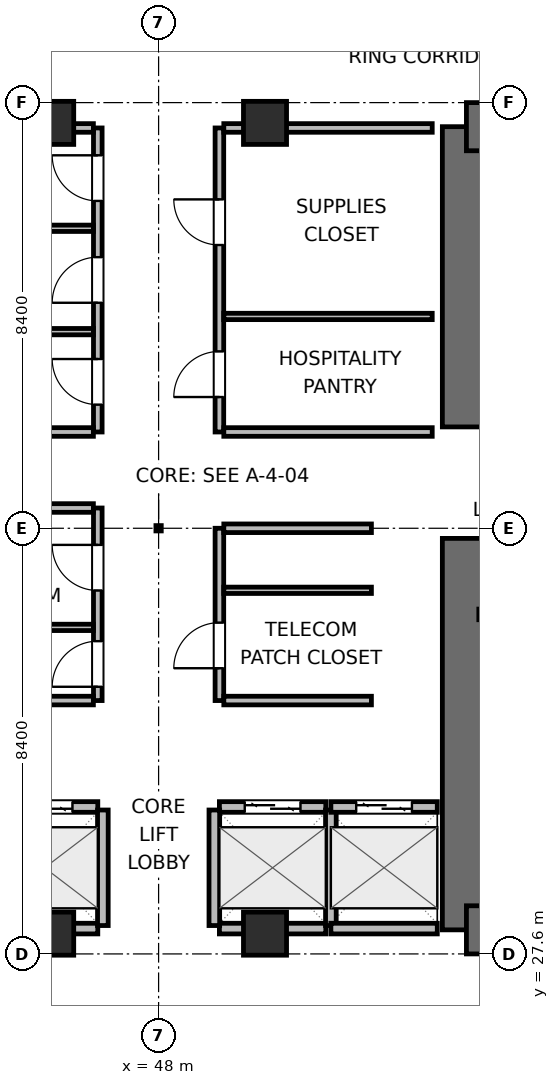
"""IFC4 building model, lengths in metres.
Left out: names, types, materials, properties, quantities, classifications, styles, units other than length and angle.
Written with IfcOpenShell. Run it as: python <this file> out.ifc"""

import sys

from ifc_helpers import new_model, si_unit, direction, frame, frame_2d, origin, origin_2d, place, context, subcontext, project, spatial, rectangle, extrude, element, fill, save


model = new_model("IFC4")
c1 = context("Model", 3, precision=1e-05, world=origin(), true_north=direction((0.0, 1.0)))
c2 = subcontext(c1, "Body", "Model", "MODEL_VIEW")
j1 = project(units=[si_unit("LENGTHUNIT", "METRE"), si_unit("PLANEANGLEUNIT", "RADIAN")], contexts=[c1])
p1 = place(None, origin())
s1 = spatial("IfcSite", under=j1, at=p1, CompositionType="ELEMENT")
p2 = place(p1, origin())
s2 = spatial("IfcBuilding", under=s1, at=p2, CompositionType="ELEMENT")
p3 = place(p2, frame((0.0, 0.0, 33.3)))
s3 = spatial("IfcBuildingStorey", under=s2, at=p3, CompositionType="ELEMENT", Elevation=33.3)
p4 = place(p3, frame((54.075, 28.075, 0.0), z_axis=(0.0, 0.0, 1.0), x_axis=(0.0, 1.0, 0.0)))
e1 = element("IfcWall", 1, at=p4, inside=s3, PredefinedType="SHEAR", context=c2, shape_type="SweptSolid", body=[
    extrude(rectangle(XDim=7.725, YDim=0.95, at=frame_2d((3.863, 0.0))), origin(), (0.0, 0.0, 1.0), 3.9),
])
p5 = place(p3, frame((54.075, 38.0, 0.0), z_axis=(0.0, 0.0, 1.0), x_axis=(0.0, 1.0, 0.0)))
e2 = element("IfcWall", 2, at=p5, inside=s3, PredefinedType="SHEAR", context=c2, shape_type="SweptSolid", body=[
    extrude(rectangle(XDim=5.925, YDim=0.95, at=frame_2d((2.962, 0.0))), origin(), (0.0, 0.0, 1.0), 3.9),
])
p6 = place(p3, frame((54.075, 28.075, 0.0), z_axis=(0.0, 0.0, 1.0), x_axis=(1.0, 0.0, 0.0)))
e3 = element("IfcWall", 3, at=p6, inside=s3, PredefinedType="SHEAR", context=c2, shape_type="SweptSolid", body=[
    extrude(rectangle(XDim=9.05, YDim=0.95, at=frame_2d((4.525, 0.0))), origin(), (0.0, 0.0, 1.0), 3.9),
])
p7 = place(p6, frame((3.925, 0.0, 0.0)))
e4 = element("IfcOpeningElement", 4, at=p7, cuts=e3, PredefinedType="OPENING", context=c2, shape_type="SweptSolid", body=[
    extrude(rectangle(XDim=1.05, YDim=2.04, at=frame_2d((0.525, 1.02))), frame((0.0, 0.485, 0.0), z_axis=(0.0, -1.0, 0.0), x_axis=(1.0, 0.0, 0.0)), (0.0, 0.0, 1.0), 0.97),
])
p8 = place(p3, frame((54.075, 43.925, 0.0), z_axis=(0.0, 0.0, 1.0), x_axis=(1.0, 0.0, 0.0)))
e5 = element("IfcWall", 5, at=p8, inside=s3, PredefinedType="SHEAR", context=c2, shape_type="SweptSolid", body=[
    extrude(rectangle(XDim=9.05, YDim=0.95, at=frame_2d((4.525, 0.0))), origin(), (0.0, 0.0, 1.0), 3.9),
])
for number, where, z_axis, x_axis in (
    (6, (45.9, 28.0, 0.0), (0.0, 0.0, 1.0), (1.0, 0.0, 0.0)),
    (7, (50.1, 28.0, 0.0), (0.0, 0.0, 1.0), (1.0, 0.0, 0.0)),
    (8, (45.9, 44.0, 0.0), (0.0, 0.0, 1.0), (1.0, 0.0, 0.0)),
    (9, (50.1, 44.0, 0.0), (0.0, 0.0, 1.0), (1.0, 0.0, 0.0)),
):
    element("IfcColumn", number, at=place(p3, frame(where, z_axis=z_axis, x_axis=x_axis)), inside=s3, PredefinedType="COLUMN", context=c2, shape_type="SweptSolid", body=[
        extrude(rectangle(XDim=0.85, YDim=0.85, at=origin_2d()), origin(), (0.0, 0.0, 1.0), 3.9),
    ])
p9 = place(p3, frame((44.7, 30.5, 0.0), z_axis=(0.0, 0.0, 1.0), x_axis=(1.0, 0.0, 0.0)))
e10 = element("IfcWall", 10, at=p9, inside=s3, PredefinedType="PARTITIONING", context=c2, shape_type="SweptSolid", body=[
    extrude(rectangle(XDim=2.1, YDim=0.21, at=frame_2d((1.05, 0.0))), origin(), (0.0, 0.0, 1.0), 3.64),
])
p10 = place(p9, frame((0.5, 0.0, 0.0)))
e11 = element("IfcOpeningElement", 11, at=p10, cuts=e10, PredefinedType="OPENING", context=c2, shape_type="SweptSolid", body=[
    extrude(rectangle(XDim=1.1, YDim=2.04, at=frame_2d((0.55, 1.02))), frame((0.0, 0.115, 0.0), z_axis=(0.0, -1.0, 0.0), x_axis=(1.0, 0.0, 0.0)), (0.0, 0.0, 1.0), 0.23),
])
p11 = place(p3, frame((44.7, 28.1, 0.0), z_axis=(0.0, 0.0, 1.0), x_axis=(1.0, 0.0, 0.0)))
e12 = element("IfcWall", 12, at=p11, inside=s3, PredefinedType="PARTITIONING", context=c2, shape_type="SweptSolid", body=[
    extrude(rectangle(XDim=2.1, YDim=0.21, at=frame_2d((1.05, 0.0))), origin(), (0.0, 0.0, 1.0), 2.525),
])
p12 = place(p3, frame((46.9, 28.16, 0.0), z_axis=(0.0, 0.0, 1.0), x_axis=(0.0, 1.0, 0.0)))
e13 = element("IfcWall", 13, at=p12, inside=s3, PredefinedType="PARTITIONING", context=c2, shape_type="SweptSolid", body=[
    extrude(rectangle(XDim=2.28, YDim=0.21, at=frame_2d((1.14, 0.0))), origin(), (0.0, 0.0, 1.0), 3.64),
])
p13 = place(p3, frame((49.2, 30.5, 0.0), z_axis=(0.0, 0.0, 1.0), x_axis=(1.0, 0.0, 0.0)))
e14 = element("IfcWall", 14, at=p13, inside=s3, PredefinedType="PARTITIONING", context=c2, shape_type="SweptSolid", body=[
    extrude(rectangle(XDim=2.1, YDim=0.21, at=frame_2d((1.05, 0.0))), origin(), (0.0, 0.0, 1.0), 3.64),
])
p14 = place(p13, frame((0.5, 0.0, 0.0)))
e15 = element("IfcOpeningElement", 15, at=p14, cuts=e14, PredefinedType="OPENING", context=c2, shape_type="SweptSolid", body=[
    extrude(rectangle(XDim=1.1, YDim=2.04, at=frame_2d((0.55, 1.02))), frame((0.0, 0.115, 0.0), z_axis=(0.0, -1.0, 0.0), x_axis=(1.0, 0.0, 0.0)), (0.0, 0.0, 1.0), 0.23),
])
p15 = place(p3, frame((49.2, 28.1, 0.0), z_axis=(0.0, 0.0, 1.0), x_axis=(1.0, 0.0, 0.0)))
e16 = element("IfcWall", 16, at=p15, inside=s3, PredefinedType="PARTITIONING", context=c2, shape_type="SweptSolid", body=[
    extrude(rectangle(XDim=2.1, YDim=0.21, at=frame_2d((1.05, 0.0))), origin(), (0.0, 0.0, 1.0), 2.525),
])
for number, where, z_axis, x_axis in (
    (17, (49.1, 28.16, 0.0), (0.0, 0.0, 1.0), (0.0, 1.0, 0.0)),
    (18, (51.4, 28.16, 0.0), (0.0, 0.0, 1.0), (0.0, 1.0, 0.0)),
):
    element("IfcWall", number, at=place(p3, frame(where, z_axis=z_axis, x_axis=x_axis)), inside=s3, PredefinedType="PARTITIONING", context=c2, shape_type="SweptSolid", body=[
        extrude(rectangle(XDim=2.28, YDim=0.21, at=frame_2d((1.14, 0.0))), origin(), (0.0, 0.0, 1.0), 3.64),
    ])
p16 = place(p3, frame((51.4, 30.5, 0.0), z_axis=(0.0, 0.0, 1.0), x_axis=(1.0, 0.0, 0.0)))
e19 = element("IfcWall", 19, at=p16, inside=s3, PredefinedType="PARTITIONING", context=c2, shape_type="SweptSolid", body=[
    extrude(rectangle(XDim=2.1, YDim=0.21, at=frame_2d((1.05, 0.0))), origin(), (0.0, 0.0, 1.0), 3.64),
])
p17 = place(p16, frame((0.5, 0.0, 0.0)))
e20 = element("IfcOpeningElement", 20, at=p17, cuts=e19, PredefinedType="OPENING", context=c2, shape_type="SweptSolid", body=[
    extrude(rectangle(XDim=1.1, YDim=2.04, at=frame_2d((0.55, 1.02))), frame((0.0, 0.115, 0.0), z_axis=(0.0, -1.0, 0.0), x_axis=(1.0, 0.0, 0.0)), (0.0, 0.0, 1.0), 0.23),
])
p18 = place(p3, frame((51.4, 28.1, 0.0), z_axis=(0.0, 0.0, 1.0), x_axis=(1.0, 0.0, 0.0)))
e21 = element("IfcWall", 21, at=p18, inside=s3, PredefinedType="PARTITIONING", context=c2, shape_type="SweptSolid", body=[
    extrude(rectangle(XDim=2.1, YDim=0.21, at=frame_2d((1.05, 0.0))), origin(), (0.0, 0.0, 1.0), 2.525),
])
p19 = place(p3, frame((46.8, 32.6, 0.0), z_axis=(0.0, 0.0, 1.0), x_axis=(0.0, 1.0, 0.0)))
e22 = element("IfcWall", 22, at=p19, inside=s3, PredefinedType="PARTITIONING", context=c2, shape_type="SweptSolid", body=[
    extrude(rectangle(XDim=3.8, YDim=0.17, at=frame_2d((1.9, 0.0))), origin(), (0.0, 0.0, 1.0), 3.64),
])
p20 = place(p19, frame((0.272, 0.0, 0.0)))
e23 = element("IfcOpeningElement", 23, at=p20, cuts=e22, PredefinedType="OPENING", context=c2, shape_type="SweptSolid", body=[
    extrude(rectangle(XDim=0.9, YDim=2.02, at=frame_2d((0.45, 1.01))), frame((0.0, 0.095, 0.0), z_axis=(0.0, -1.0, 0.0), x_axis=(1.0, 0.0, 0.0)), (0.0, 0.0, 1.0), 0.19),
])
p21 = place(p19, frame((2.172, 0.0, 0.0)))
e24 = element("IfcOpeningElement", 24, at=p21, cuts=e22, PredefinedType="OPENING", context=c2, shape_type="SweptSolid", body=[
    extrude(rectangle(XDim=0.9, YDim=2.02, at=frame_2d((0.45, 1.01))), frame((0.0, 0.095, 0.0), z_axis=(0.0, -1.0, 0.0), x_axis=(1.0, 0.0, 0.0)), (0.0, 0.0, 1.0), 0.19),
])
for number, where, z_axis, x_axis in (
    (25, (43.8, 32.6, 0.0), (0.0, 0.0, 1.0), (1.0, 0.0, 0.0)),
    (26, (43.8, 36.4, 0.0), (0.0, 0.0, 1.0), (1.0, 0.0, 0.0)),
):
    element("IfcWall", number, at=place(p3, frame(where, z_axis=z_axis, x_axis=x_axis)), inside=s3, PredefinedType="PARTITIONING", context=c2, shape_type="SweptSolid", body=[
        extrude(rectangle(XDim=2.913, YDim=0.17, at=frame_2d((1.457, 0.0))), origin(), (0.0, 0.0, 1.0), 3.64),
    ])
p22 = place(p3, frame((43.8, 34.044, 0.0), z_axis=(0.0, 0.0, 1.0), x_axis=(1.0, 0.0, 0.0)))
e27 = element("IfcWall", 27, at=p22, inside=s3, PredefinedType="PARTITIONING", context=c2, shape_type="SweptSolid", body=[
    extrude(rectangle(XDim=2.913, YDim=0.125, at=frame_2d((1.457, 0.0))), origin(), (0.0, 0.0, 1.0), 3.64),
])
p23 = place(p3, frame((49.2, 32.6, 0.0), z_axis=(0.0, 0.0, 1.0), x_axis=(0.0, 1.0, 0.0)))
e28 = element("IfcWall", 28, at=p23, inside=s3, PredefinedType="PARTITIONING", context=c2, shape_type="SweptSolid", body=[
    extrude(rectangle(XDim=3.4, YDim=0.17, at=frame_2d((1.7, 0.0))), origin(), (0.0, 0.0, 1.0), 3.64),
])
p24 = place(p23, frame((0.638, 0.0, 0.0)))
e29 = element("IfcOpeningElement", 29, at=p24, cuts=e28, PredefinedType="OPENING", context=c2, shape_type="SweptSolid", body=[
    extrude(rectangle(XDim=0.9, YDim=2.02, at=frame_2d((0.45, 1.01))), frame((0.0, 0.095, 0.0), z_axis=(0.0, -1.0, 0.0), x_axis=(1.0, 0.0, 0.0)), (0.0, 0.0, 1.0), 0.19),
])
for number, where, z_axis, x_axis in (
    (30, (49.287, 32.6, 0.0), (0.0, 0.0, 1.0), (1.0, 0.0, 0.0)),
    (31, (49.287, 36.0, 0.0), (0.0, 0.0, 1.0), (1.0, 0.0, 0.0)),
):
    element("IfcWall", number, at=place(p3, frame(where, z_axis=z_axis, x_axis=x_axis)), inside=s3, PredefinedType="PARTITIONING", context=c2, shape_type="SweptSolid", body=[
        extrude(rectangle(XDim=2.913, YDim=0.17, at=frame_2d((1.457, 0.0))), origin(), (0.0, 0.0, 1.0), 3.64),
    ])
p25 = place(p3, frame((49.287, 34.776, 0.0), z_axis=(0.0, 0.0, 1.0), x_axis=(1.0, 0.0, 0.0)))
e32 = element("IfcWall", 32, at=p25, inside=s3, PredefinedType="PARTITIONING", context=c2, shape_type="SweptSolid", body=[
    extrude(rectangle(XDim=2.913, YDim=0.125, at=frame_2d((1.457, 0.0))), origin(), (0.0, 0.0, 1.0), 3.64),
])
p26 = place(p3, frame((46.8, 37.9, 0.0), z_axis=(0.0, 0.0, 1.0), x_axis=(0.0, 1.0, 0.0)))
e33 = element("IfcWall", 33, at=p26, inside=s3, PredefinedType="PARTITIONING", context=c2, shape_type="SweptSolid", body=[
    extrude(rectangle(XDim=6.0, YDim=0.17, at=frame_2d((3.0, 0.0))), origin(), (0.0, 0.0, 1.0), 3.64),
])
p27 = place(p26, frame((0.54, 0.0, 0.0)))
e34 = element("IfcOpeningElement", 34, at=p27, cuts=e33, PredefinedType="OPENING", context=c2, shape_type="SweptSolid", body=[
    extrude(rectangle(XDim=0.9, YDim=2.02, at=frame_2d((0.45, 1.01))), frame((0.0, 0.095, 0.0), z_axis=(0.0, -1.0, 0.0), x_axis=(1.0, 0.0, 0.0)), (0.0, 0.0, 1.0), 0.19),
])
p28 = place(p26, frame((2.55, 0.0, 0.0)))
e35 = element("IfcOpeningElement", 35, at=p28, cuts=e33, PredefinedType="OPENING", context=c2, shape_type="SweptSolid", body=[
    extrude(rectangle(XDim=0.9, YDim=2.02, at=frame_2d((0.45, 1.01))), frame((0.0, 0.095, 0.0), z_axis=(0.0, -1.0, 0.0), x_axis=(1.0, 0.0, 0.0)), (0.0, 0.0, 1.0), 0.19),
])
p29 = place(p26, frame((4.56, 0.0, 0.0)))
e36 = element("IfcOpeningElement", 36, at=p29, cuts=e33, PredefinedType="OPENING", context=c2, shape_type="SweptSolid", body=[
    extrude(rectangle(XDim=0.9, YDim=2.02, at=frame_2d((0.45, 1.01))), frame((0.0, 0.095, 0.0), z_axis=(0.0, -1.0, 0.0), x_axis=(1.0, 0.0, 0.0)), (0.0, 0.0, 1.0), 0.19),
])
p30 = place(p3, frame((42.5, 37.9, 0.0), z_axis=(0.0, 0.0, 1.0), x_axis=(1.0, 0.0, 0.0)))
e37 = element("IfcWall", 37, at=p30, inside=s3, PredefinedType="PARTITIONING", context=c2, shape_type="SweptSolid", body=[
    extrude(rectangle(XDim=4.213, YDim=0.17, at=frame_2d((2.106, 0.0))), origin(), (0.0, 0.0, 1.0), 3.64),
])
p31 = place(p3, frame((42.5, 43.9, 0.0), z_axis=(0.0, 0.0, 1.0), x_axis=(1.0, 0.0, 0.0)))
e38 = element("IfcWall", 38, at=p31, inside=s3, PredefinedType="PARTITIONING", context=c2, shape_type="SweptSolid", body=[
    extrude(rectangle(XDim=4.213, YDim=0.17, at=frame_2d((2.106, 0.0))), origin(), (0.0, 0.0, 1.0), 2.525),
])
for number, where, z_axis, x_axis in (
    (39, (42.5, 39.88, 0.0), (0.0, 0.0, 1.0), (1.0, 0.0, 0.0)),
    (40, (42.5, 41.92, 0.0), (0.0, 0.0, 1.0), (1.0, 0.0, 0.0)),
):
    element("IfcWall", number, at=place(p3, frame(where, z_axis=z_axis, x_axis=x_axis)), inside=s3, PredefinedType="PARTITIONING", context=c2, shape_type="SweptSolid", body=[
        extrude(rectangle(XDim=4.213, YDim=0.125, at=frame_2d((2.106, 0.0))), origin(), (0.0, 0.0, 1.0), 3.64),
    ])
p32 = place(p3, frame((49.2, 37.9, 0.0), z_axis=(0.0, 0.0, 1.0), x_axis=(0.0, 1.0, 0.0)))
e41 = element("IfcWall", 41, at=p32, inside=s3, PredefinedType="PARTITIONING", context=c2, shape_type="SweptSolid", body=[
    extrude(rectangle(XDim=6.0, YDim=0.17, at=frame_2d((3.0, 0.0))), origin(), (0.0, 0.0, 1.0), 3.64),
])
p33 = place(p32, frame((0.69, 0.0, 0.0)))
e42 = element("IfcOpeningElement", 42, at=p33, cuts=e41, PredefinedType="OPENING", context=c2, shape_type="SweptSolid", body=[
    extrude(rectangle(XDim=0.9, YDim=2.02, at=frame_2d((0.45, 1.01))), frame((0.0, 0.095, 0.0), z_axis=(0.0, -1.0, 0.0), x_axis=(1.0, 0.0, 0.0)), (0.0, 0.0, 1.0), 0.19),
])
p34 = place(p32, frame((3.69, 0.0, 0.0)))
e43 = element("IfcOpeningElement", 43, at=p34, cuts=e41, PredefinedType="OPENING", context=c2, shape_type="SweptSolid", body=[
    extrude(rectangle(XDim=0.9, YDim=2.02, at=frame_2d((0.45, 1.01))), frame((0.0, 0.095, 0.0), z_axis=(0.0, -1.0, 0.0), x_axis=(1.0, 0.0, 0.0)), (0.0, 0.0, 1.0), 0.19),
])
p35 = place(p3, frame((49.287, 37.9, 0.0), z_axis=(0.0, 0.0, 1.0), x_axis=(1.0, 0.0, 0.0)))
e44 = element("IfcWall", 44, at=p35, inside=s3, PredefinedType="PARTITIONING", context=c2, shape_type="SweptSolid", body=[
    extrude(rectangle(XDim=4.113, YDim=0.17, at=frame_2d((2.056, 0.0))), origin(), (0.0, 0.0, 1.0), 3.64),
])
p36 = place(p3, frame((49.287, 43.9, 0.0), z_axis=(0.0, 0.0, 1.0), x_axis=(1.0, 0.0, 0.0)))
e45 = element("IfcWall", 45, at=p36, inside=s3, PredefinedType="PARTITIONING", context=c2, shape_type="SweptSolid", body=[
    extrude(rectangle(XDim=4.113, YDim=0.17, at=frame_2d((2.056, 0.0))), origin(), (0.0, 0.0, 1.0), 2.525),
])
p37 = place(p3, frame((49.287, 40.18, 0.0), z_axis=(0.0, 0.0, 1.0), x_axis=(1.0, 0.0, 0.0)))
e46 = element("IfcWall", 46, at=p37, inside=s3, PredefinedType="PARTITIONING", context=c2, shape_type="SweptSolid", body=[
    extrude(rectangle(XDim=4.113, YDim=0.125, at=frame_2d((2.056, 0.0))), origin(), (0.0, 0.0, 1.0), 3.64),
])
p38 = place(p10, origin())
e47 = element("IfcDoor", 47, at=p38, inside=s3, OperationType="DOUBLE_DOOR_SLIDING", PredefinedType="DOOR", context=c2, shape_type="SweptSolid", body=[
    extrude(rectangle(XDim=1.1, YDim=2.04, at=frame_2d((0.55, 1.02))), frame((0.0, 0.025, 0.0), z_axis=(0.0, -1.0, 0.0), x_axis=(1.0, 0.0, 0.0)), (0.0, 0.0, 1.0), 0.05),
])
fill(e11, e47)
p39 = place(p14, origin())
e48 = element("IfcDoor", 48, at=p39, inside=s3, OperationType="DOUBLE_DOOR_SLIDING", PredefinedType="DOOR", context=c2, shape_type="SweptSolid", body=[
    extrude(rectangle(XDim=1.1, YDim=2.04, at=frame_2d((0.55, 1.02))), frame((0.0, 0.025, 0.0), z_axis=(0.0, -1.0, 0.0), x_axis=(1.0, 0.0, 0.0)), (0.0, 0.0, 1.0), 0.05),
])
fill(e15, e48)
p40 = place(p17, origin())
e49 = element("IfcDoor", 49, at=p40, inside=s3, OperationType="DOUBLE_DOOR_SLIDING", PredefinedType="DOOR", context=c2, shape_type="SweptSolid", body=[
    extrude(rectangle(XDim=1.1, YDim=2.04, at=frame_2d((0.55, 1.02))), frame((0.0, 0.025, 0.0), z_axis=(0.0, -1.0, 0.0), x_axis=(1.0, 0.0, 0.0)), (0.0, 0.0, 1.0), 0.05),
])
fill(e20, e49)
p41 = place(p20, origin())
e50 = element("IfcDoor", 50, at=p41, inside=s3, OperationType="SINGLE_SWING_LEFT", PredefinedType="DOOR", context=c2, shape_type="SweptSolid", body=[
    extrude(rectangle(XDim=0.9, YDim=2.02, at=frame_2d((0.45, 1.01))), frame((0.0, 0.025, 0.0), z_axis=(0.0, -1.0, 0.0), x_axis=(1.0, 0.0, 0.0)), (0.0, 0.0, 1.0), 0.05),
])
fill(e23, e50)
p42 = place(p21, origin())
e51 = element("IfcDoor", 51, at=p42, inside=s3, OperationType="SINGLE_SWING_RIGHT", PredefinedType="DOOR", context=c2, shape_type="SweptSolid", body=[
    extrude(rectangle(XDim=0.9, YDim=2.02, at=frame_2d((0.45, 1.01))), frame((0.0, 0.025, 0.0), z_axis=(0.0, -1.0, 0.0), x_axis=(1.0, 0.0, 0.0)), (0.0, 0.0, 1.0), 0.05),
])
fill(e24, e51)
p43 = place(p24, origin())
e52 = element("IfcDoor", 52, at=p43, inside=s3, OperationType="SINGLE_SWING_LEFT", PredefinedType="DOOR", context=c2, shape_type="SweptSolid", body=[
    extrude(rectangle(XDim=0.9, YDim=2.02, at=frame_2d((0.45, 1.01))), frame((0.0, 0.025, 0.0), z_axis=(0.0, -1.0, 0.0), x_axis=(1.0, 0.0, 0.0)), (0.0, 0.0, 1.0), 0.05),
])
fill(e29, e52)
p44 = place(p27, origin())
e53 = element("IfcDoor", 53, at=p44, inside=s3, OperationType="SINGLE_SWING_RIGHT", PredefinedType="DOOR", context=c2, shape_type="SweptSolid", body=[
    extrude(rectangle(XDim=0.9, YDim=2.02, at=frame_2d((0.45, 1.01))), frame((0.0, 0.025, 0.0), z_axis=(0.0, -1.0, 0.0), x_axis=(1.0, 0.0, 0.0)), (0.0, 0.0, 1.0), 0.05),
])
fill(e34, e53)
p45 = place(p28, origin())
e54 = element("IfcDoor", 54, at=p45, inside=s3, OperationType="SINGLE_SWING_LEFT", PredefinedType="DOOR", context=c2, shape_type="SweptSolid", body=[
    extrude(rectangle(XDim=0.9, YDim=2.02, at=frame_2d((0.45, 1.01))), frame((0.0, 0.025, 0.0), z_axis=(0.0, -1.0, 0.0), x_axis=(1.0, 0.0, 0.0)), (0.0, 0.0, 1.0), 0.05),
])
fill(e35, e54)
p46 = place(p29, origin())
e55 = element("IfcDoor", 55, at=p46, inside=s3, OperationType="SINGLE_SWING_RIGHT", PredefinedType="DOOR", context=c2, shape_type="SweptSolid", body=[
    extrude(rectangle(XDim=0.9, YDim=2.02, at=frame_2d((0.45, 1.01))), frame((0.0, 0.025, 0.0), z_axis=(0.0, -1.0, 0.0), x_axis=(1.0, 0.0, 0.0)), (0.0, 0.0, 1.0), 0.05),
])
fill(e36, e55)
p47 = place(p33, origin())
e56 = element("IfcDoor", 56, at=p47, inside=s3, OperationType="SINGLE_SWING_LEFT", PredefinedType="DOOR", context=c2, shape_type="SweptSolid", body=[
    extrude(rectangle(XDim=0.9, YDim=2.02, at=frame_2d((0.45, 1.01))), frame((0.0, 0.025, 0.0), z_axis=(0.0, -1.0, 0.0), x_axis=(1.0, 0.0, 0.0)), (0.0, 0.0, 1.0), 0.05),
])
fill(e42, e56)
p48 = place(p34, origin())
e57 = element("IfcDoor", 57, at=p48, inside=s3, OperationType="SINGLE_SWING_RIGHT", PredefinedType="DOOR", context=c2, shape_type="SweptSolid", body=[
    extrude(rectangle(XDim=0.9, YDim=2.02, at=frame_2d((0.45, 1.01))), frame((0.0, 0.025, 0.0), z_axis=(0.0, -1.0, 0.0), x_axis=(1.0, 0.0, 0.0)), (0.0, 0.0, 1.0), 0.05),
])
fill(e43, e57)
save(model, sys.argv[1])
